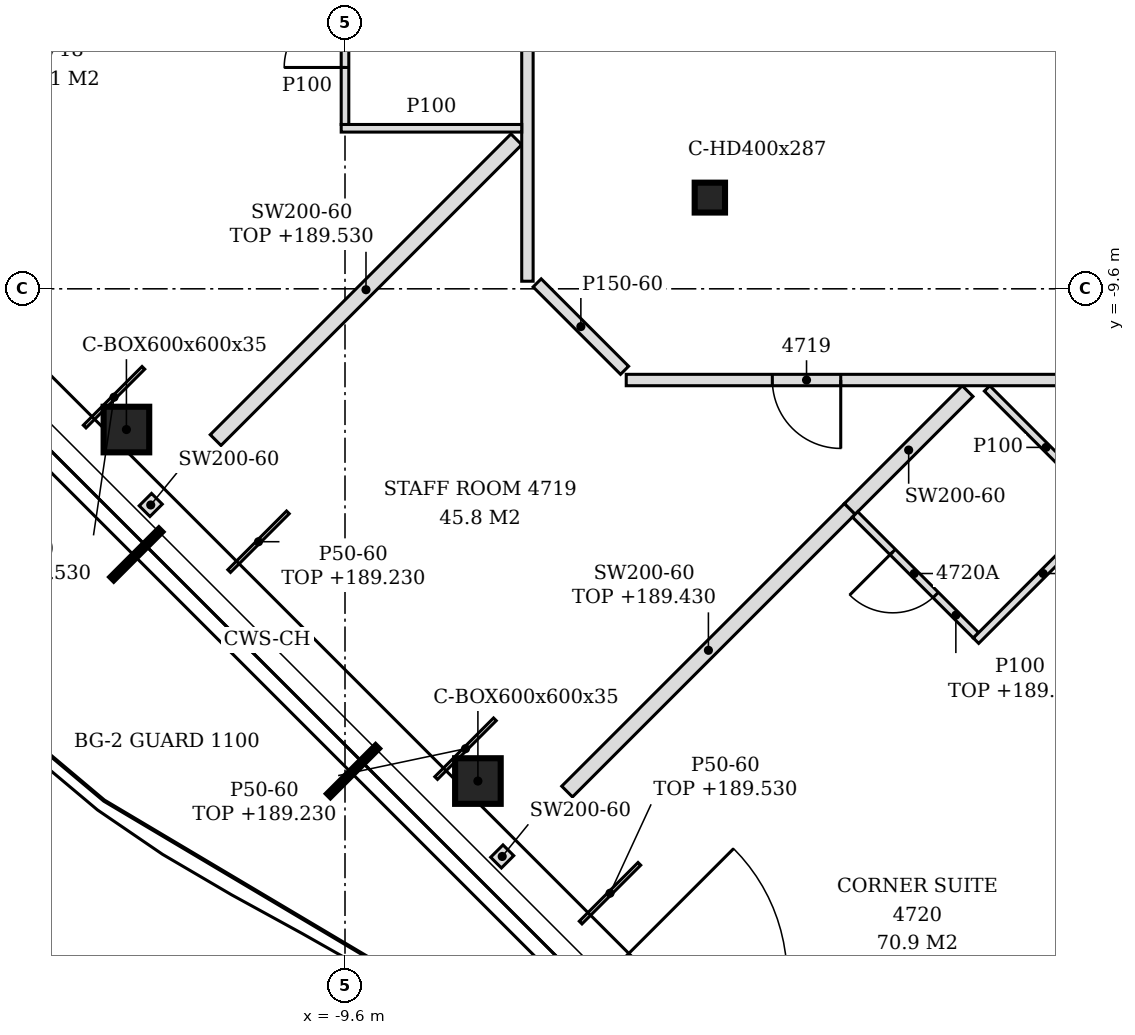
"""IFC4 building model, lengths in metres.
Left out: names, types, materials, properties, quantities, classifications, styles, units other than length and angle.
Written with IfcOpenShell. Run it as: python <this file> out.ifc"""

import sys

from ifc_helpers import new_model, si_unit, direction, frame, frame_2d, origin, origin_2d, place, context, subcontext, project, spatial, polyline, rectangle, hollow_rectangle, i_section, outline, extrude, clip, halfspace, element, fill, save


model = new_model("IFC4")
c1 = context("Model", 3, precision=1e-05, world=origin(), true_north=direction((0.0, 1.0)))
c2 = subcontext(c1, "Body", "Model", "MODEL_VIEW")
j1 = project(units=[si_unit("LENGTHUNIT", "METRE"), si_unit("PLANEANGLEUNIT", "RADIAN")], contexts=[c1])
p1 = place(None, origin())
s1 = spatial("IfcSite", under=j1, at=p1, CompositionType="ELEMENT")
p2 = place(p1, origin())
s2 = spatial("IfcBuilding", under=s1, at=p2, CompositionType="ELEMENT")
p3 = place(p2, frame((0.0, 0.0, 186.6)))
s3 = spatial("IfcBuildingStorey", under=s2, at=p3, CompositionType="ELEMENT", Elevation=186.6)
for number, where, z_axis, x_axis in (
    (1, (-12.476, -11.451, -0.15), (0.387, -0.258, 0.885), (0.555, 0.832, 0.0)),
    (2, (-7.852, -16.076, -0.15), (0.387, -0.258, 0.885), (0.555, 0.832, 0.0)),
):
    element("IfcColumn", number, at=place(p3, frame(where, z_axis=z_axis, x_axis=x_axis)), inside=s3, PredefinedType="COLUMN", context=c2, shape_type="Clipping", body=[
        clip(extrude(hollow_rectangle(XDim=0.6, YDim=0.6, WallThickness=0.035, at=origin_2d()), origin(), (0.0, 0.0, 1.0), 4.067), halfspace(frame((0.0, 0.0, 4.049), z_axis=(0.0, 0.0, 1.0), x_axis=(1.0, 0.0, 0.0)), False)),
    ])
p4 = place(p3, frame((-4.8, -8.4, -0.15), z_axis=(0.0, 0.0, 1.0), x_axis=(1.0, 0.0, 0.0)))
e3 = element("IfcColumn", 3, at=p4, inside=s3, PredefinedType="COLUMN", context=c2, shape_type="SweptSolid", body=[
    extrude(i_section(OverallWidth=0.399, OverallDepth=0.393, WebThickness=0.023, FlangeThickness=0.037, FilletRadius=0.015, at=origin_2d()), origin(), (0.0, 0.0, 1.0), 3.6),
])
p5 = place(p3, frame((-7.613, -17.149, 0.0), z_axis=(0.0, 0.0, 1.0), x_axis=(0.707639441435, 0.706573719385, 0.0)))
e4 = element("IfcWall", 4, at=p5, inside=s3, PredefinedType="PARTITIONING", context=c2, shape_type="SweptSolid", body=[
    extrude(rectangle(XDim=0.229, YDim=0.2, at=frame_2d((0.115, 0.0))), origin(), (0.0, 0.0, 1.0), 3.45),
])
p6 = place(p3, frame((-6.678, -16.214, 0.0), z_axis=(0.0, 0.0, 1.0), x_axis=(0.707199650476, 0.707013899698, 0.0)))
e5 = element("IfcWall", 5, at=p6, inside=s3, PredefinedType="PARTITIONING", context=c2, shape_type="SweptSolid", body=[
    extrude(rectangle(XDim=5.257, YDim=0.2, at=frame_2d((2.629, 0.0))), origin(), (0.0, 0.0, 1.0), 2.83),
])
p7 = place(p3, frame((-1.298, -14.159, 0.0), z_axis=(0.0, 0.0, 1.0), x_axis=(-0.707106781187, 0.707106781187, 0.0)))
e6 = element("IfcWall", 6, at=p7, inside=s3, PredefinedType="PARTITIONING", context=c2, shape_type="SweptSolid", body=[
    extrude(rectangle(XDim=2.25, YDim=0.1, at=frame_2d((1.125, 0.0))), origin(), (0.0, 0.0, 1.0), 2.88),
])
p8 = place(p7, frame((0.75, 0.0, 0.0)))
e7 = element("IfcOpeningElement", 7, at=p8, cuts=e6, PredefinedType="OPENING", context=c2, shape_type="SweptSolid", body=[
    extrude(rectangle(XDim=0.8, YDim=2.1, at=frame_2d((0.4, 1.05))), frame((0.0, 0.06, 0.0), z_axis=(0.0, -1.0, 0.0), x_axis=(1.0, 0.0, 0.0)), (0.0, 0.0, 1.0), 0.12),
])
p9 = place(p3, frame((-1.298, -14.229, 0.0), z_axis=(0.0, 0.0, 1.0), x_axis=(0.707057949532, 0.707155609469, 0.0)))
e8 = element("IfcWall", 8, at=p9, inside=s3, PredefinedType="PARTITIONING", context=c2, shape_type="SweptSolid", body=[
    extrude(rectangle(XDim=2.5, YDim=0.1, at=frame_2d((1.25, 0.0))), origin(), (0.0, 0.0, 1.0), 2.88),
])
p10 = place(p3, frame((-12.237, -12.525, 0.0), z_axis=(0.0, 0.0, 1.0), x_axis=(0.706574521886, 0.707638640142, 0.0)))
e9 = element("IfcWall", 9, at=p10, inside=s3, PredefinedType="PARTITIONING", context=c2, shape_type="SweptSolid", body=[
    extrude(rectangle(XDim=0.229, YDim=0.2, at=frame_2d((0.115, 0.0))), origin(), (0.0, 0.0, 1.0), 3.45),
])
p11 = place(p3, frame((-2.96, -12.497, 0.0), z_axis=(0.0, 0.0, 1.0), x_axis=(0.707106781187, 0.707106781187, 0.0)))
e10 = element("IfcWall", 10, at=p11, inside=s3, PredefinedType="PARTITIONING", context=c2, shape_type="SweptSolid", body=[
    extrude(rectangle(XDim=2.194, YDim=0.2, at=frame_2d((1.097, 0.0))), origin(), (0.0, 0.0, 1.0), 3.45),
])
p12 = place(p3, frame((0.399, -12.462, 0.0), z_axis=(0.0, 0.0, 1.0), x_axis=(-0.707106781187, 0.707106781187, 0.0)))
e11 = element("IfcWall", 11, at=p12, inside=s3, PredefinedType="PARTITIONING", context=c2, shape_type="SweptSolid", body=[
    extrude(rectangle(XDim=2.194, YDim=0.1, at=frame_2d((1.097, 0.0))), origin(), (0.0, 0.0, 1.0), 3.45),
])
p13 = place(p3, frame((-11.302, -11.59, 0.0), z_axis=(0.0, 0.0, 1.0), x_axis=(0.707106781187, 0.707106781187, 0.0)))
e12 = element("IfcWall", 12, at=p13, inside=s3, PredefinedType="PARTITIONING", context=c2, shape_type="SweptSolid", body=[
    extrude(rectangle(XDim=5.595, YDim=0.2, at=frame_2d((2.797, 0.0))), origin(), (0.0, 0.0, 1.0), 2.93),
])
p14 = place(p3, frame((-5.9, -10.8, 0.0), z_axis=(0.0, 0.0, 1.0), x_axis=(1.0, 0.0, 0.0)))
e13 = element("IfcWall", 13, at=p14, inside=s3, PredefinedType="PARTITIONING", context=c2, shape_type="SweptSolid", body=[
    extrude(outline(polyline([(0.0, 0.0), (26.2, 0.0), (26.2, 3.45), (25.25, 3.45), (25.248, 2.73), (24.95, 2.73), (24.948, 3.45), (13.25, 3.45), (13.248, 2.73), (12.95, 2.73), (12.948, 3.45), (1.25, 3.45), (1.248, 2.83), (0.95, 2.83), (0.948, 3.45), (0.0, 3.45), (0.0, 0.0)])), frame((0.0, 0.075, 0.0), z_axis=(0.0, -1.0, 0.0), x_axis=(1.0, 0.0, 0.0)), (0.0, 0.0, 1.0), 0.15),
])
p15 = place(p14, frame((1.922, 0.0, 0.0)))
e14 = element("IfcOpeningElement", 14, at=p15, cuts=e13, PredefinedType="OPENING", context=c2, shape_type="SweptSolid", body=[
    extrude(rectangle(XDim=0.9, YDim=2.1, at=frame_2d((0.45, 1.05))), frame((0.0, 0.085, 0.0), z_axis=(0.0, -1.0, 0.0), x_axis=(1.0, 0.0, 0.0)), (0.0, 0.0, 1.0), 0.17),
])
p16 = place(p14, frame((5.863, 0.0, 0.0)))
e15 = element("IfcOpeningElement", 15, at=p16, cuts=e13, PredefinedType="OPENING", context=c2, shape_type="SweptSolid", body=[
    extrude(rectangle(XDim=0.9, YDim=2.1, at=frame_2d((0.45, 1.05))), frame((0.0, 0.085, 0.0), z_axis=(0.0, -1.0, 0.0), x_axis=(1.0, 0.0, 0.0)), (0.0, 0.0, 1.0), 0.17),
])
p17 = place(p14, frame((9.95, 0.0, 0.0)))
e16 = element("IfcOpeningElement", 16, at=p17, cuts=e13, PredefinedType="OPENING", context=c2, shape_type="SweptSolid", body=[
    extrude(rectangle(XDim=0.9, YDim=2.1, at=frame_2d((0.45, 1.05))), frame((0.0, 0.085, 0.0), z_axis=(0.0, -1.0, 0.0), x_axis=(1.0, 0.0, 0.0)), (0.0, 0.0, 1.0), 0.17),
])
p18 = place(p14, frame((14.279, 0.0, 0.0)))
e17 = element("IfcOpeningElement", 17, at=p18, cuts=e13, PredefinedType="OPENING", context=c2, shape_type="SweptSolid", body=[
    extrude(rectangle(XDim=0.9, YDim=2.1, at=frame_2d((0.45, 1.05))), frame((0.0, 0.085, 0.0), z_axis=(0.0, -1.0, 0.0), x_axis=(1.0, 0.0, 0.0)), (0.0, 0.0, 1.0), 0.17),
])
p19 = place(p3, frame((-5.922, -10.672, 0.0), z_axis=(0.0, 0.0, 1.0), x_axis=(-0.707031720757, 0.707181833649, 0.0)))
e18 = element("IfcWall", 18, at=p19, inside=s3, PredefinedType="PARTITIONING", context=c2, shape_type="SweptSolid", body=[
    extrude(rectangle(XDim=1.626, YDim=0.15, at=frame_2d((0.813, 0.0))), origin(), (0.0, 0.0, 1.0), 3.45),
])
p20 = place(p3, frame((-7.2, -9.5, 0.0), z_axis=(0.0, 0.0, 1.0), x_axis=(0.0, 1.0, 0.0)))
e19 = element("IfcWall", 19, at=p20, inside=s3, PredefinedType="PARTITIONING", context=c2, shape_type="SweptSolid", body=[
    extrude(outline(polyline([(0.0, 0.0), (23.513, 0.0), (23.513, 3.45), (20.55, 3.45), (20.548, 2.93), (20.35, 2.93), (20.348, 3.45), (15.75, 3.45), (15.748, 2.93), (15.55, 2.93), (15.548, 3.45), (10.95, 3.45), (10.948, 2.93), (10.75, 2.93), (10.748, 3.45), (6.15, 3.45), (6.148, 2.93), (5.95, 2.93), (5.948, 3.45), (1.35, 3.45), (1.348, 2.93), (1.15, 2.93), (1.148, 3.45), (0.0, 3.45), (0.0, 0.0)])), frame((0.0, 0.075, 0.0), z_axis=(0.0, -1.0, 0.0), x_axis=(1.0, 0.0, 0.0)), (0.0, 0.0, 1.0), 0.15),
])
p21 = place(p20, frame((17.095, 0.0, 0.0)))
e20 = element("IfcOpeningElement", 20, at=p21, cuts=e19, PredefinedType="OPENING", context=c2, shape_type="SweptSolid", body=[
    extrude(rectangle(XDim=0.9, YDim=2.1, at=frame_2d((0.45, 1.05))), frame((0.0, 0.085, 0.0), z_axis=(0.0, -1.0, 0.0), x_axis=(1.0, 0.0, 0.0)), (0.0, 0.0, 1.0), 0.17),
])
p22 = place(p20, frame((13.494, 0.0, 0.0)))
e21 = element("IfcOpeningElement", 21, at=p22, cuts=e19, PredefinedType="OPENING", context=c2, shape_type="SweptSolid", body=[
    extrude(rectangle(XDim=0.9, YDim=2.1, at=frame_2d((0.45, 1.05))), frame((0.0, 0.085, 0.0), z_axis=(0.0, -1.0, 0.0), x_axis=(1.0, 0.0, 0.0)), (0.0, 0.0, 1.0), 0.17),
])
p23 = place(p20, frame((7.68, 0.0, 0.0)))
e22 = element("IfcOpeningElement", 22, at=p23, cuts=e19, PredefinedType="OPENING", context=c2, shape_type="SweptSolid", body=[
    extrude(rectangle(XDim=0.9, YDim=2.1, at=frame_2d((0.45, 1.05))), frame((0.0, 0.085, 0.0), z_axis=(0.0, -1.0, 0.0), x_axis=(1.0, 0.0, 0.0)), (0.0, 0.0, 1.0), 0.17),
])
p24 = place(p20, frame((5.137, 0.0, 0.0)))
e23 = element("IfcOpeningElement", 23, at=p24, cuts=e19, PredefinedType="OPENING", context=c2, shape_type="SweptSolid", body=[
    extrude(rectangle(XDim=0.9, YDim=2.1, at=frame_2d((0.45, 1.05))), frame((0.0, 0.085, 0.0), z_axis=(0.0, -1.0, 0.0), x_axis=(1.0, 0.0, 0.0)), (0.0, 0.0, 1.0), 0.17),
])
p25 = place(p3, frame((-9.65, -7.488, 0.0), z_axis=(0.0, 0.0, 1.0), x_axis=(1.0, 0.0, 0.0)))
e24 = element("IfcWall", 24, at=p25, inside=s3, PredefinedType="PARTITIONING", context=c2, shape_type="SweptSolid", body=[
    extrude(rectangle(XDim=2.375, YDim=0.1, at=frame_2d((1.188, 0.0))), origin(), (0.0, 0.0, 1.0), 3.45),
])
p26 = place(p3, frame((-9.6, -7.438, 0.0), z_axis=(0.0, 0.0, 1.0), x_axis=(0.0, 1.0, 0.0)))
e25 = element("IfcWall", 25, at=p26, inside=s3, PredefinedType="PARTITIONING", context=c2, shape_type="SweptSolid", body=[
    extrude(rectangle(XDim=2.3, YDim=0.1, at=frame_2d((1.15, 0.0))), origin(), (0.0, 0.0, 1.0), 3.45),
])
p27 = place(p26, frame((0.75, 0.0, 0.0)))
e26 = element("IfcOpeningElement", 26, at=p27, cuts=e25, PredefinedType="OPENING", context=c2, shape_type="SweptSolid", body=[
    extrude(rectangle(XDim=0.8, YDim=2.1, at=frame_2d((0.4, 1.05))), frame((0.0, 0.06, 0.0), z_axis=(0.0, -1.0, 0.0), x_axis=(1.0, 0.0, 0.0)), (0.0, 0.0, 1.0), 0.12),
])
p28 = place(p3, frame((-6.5, -17.938, 0.0), z_axis=(0.0, 0.0, 1.0), x_axis=(0.707106781187, 0.707106781187, 0.0)))
e27 = element("IfcWall", 27, at=p28, inside=s3, PredefinedType="PARTITIONING", context=c2, shape_type="SweptSolid", body=[
    extrude(rectangle(XDim=1.093, YDim=0.05, at=frame_2d((0.546, 0.0))), origin(), (0.0, 0.0, 1.0), 2.93),
])
p29 = place(p3, frame((-8.401, -16.036, 0.0), z_axis=(0.0, 0.0, 1.0), x_axis=(0.707106781187, 0.707106781187, 0.0)))
e28 = element("IfcWall", 28, at=p29, inside=s3, PredefinedType="PARTITIONING", context=c2, shape_type="SweptSolid", body=[
    extrude(rectangle(XDim=1.093, YDim=0.05, at=frame_2d((0.546, 0.0))), origin(), (0.0, 0.0, 1.0), 2.63),
])
p30 = place(p3, frame((-13.025, -11.412, 0.0), z_axis=(0.0, 0.0, 1.0), x_axis=(0.707106781187, 0.707106781187, 0.0)))
e29 = element("IfcWall", 29, at=p30, inside=s3, PredefinedType="PARTITIONING", context=c2, shape_type="SweptSolid", body=[
    extrude(rectangle(XDim=1.093, YDim=0.05, at=frame_2d((0.546, 0.0))), origin(), (0.0, 0.0, 1.0), 2.93),
])
p31 = place(p3, frame((-11.124, -13.313, 0.0), z_axis=(0.0, 0.0, 1.0), x_axis=(0.707106781187, 0.707106781187, 0.0)))
e30 = element("IfcWall", 30, at=p31, inside=s3, PredefinedType="PARTITIONING", context=c2, shape_type="SweptSolid", body=[
    extrude(rectangle(XDim=1.093, YDim=0.05, at=frame_2d((0.546, 0.0))), origin(), (0.0, 0.0, 1.0), 2.63),
])
p32 = place(p27, origin())
e31 = element("IfcDoor", 31, at=p32, inside=s3, OperationType="SINGLE_SWING_LEFT", PredefinedType="DOOR", context=c2, shape_type="SweptSolid", body=[
    extrude(rectangle(XDim=0.8, YDim=2.1, at=frame_2d((0.4, 1.05))), frame((0.0, 0.025, 0.0), z_axis=(0.0, -1.0, 0.0), x_axis=(1.0, 0.0, 0.0)), (0.0, 0.0, 1.0), 0.05),
])
fill(e26, e31)
p33 = place(p15, frame((0.9, 0.0, 0.0), z_axis=(0.0, 0.0, 1.0), x_axis=(-1.0, 0.0, 0.0)))
e32 = element("IfcDoor", 32, at=p33, inside=s3, OperationType="SINGLE_SWING_LEFT", PredefinedType="DOOR", context=c2, shape_type="SweptSolid", body=[
    extrude(rectangle(XDim=0.9, YDim=2.1, at=frame_2d((0.45, 1.05))), frame((0.0, 0.025, 0.0), z_axis=(0.0, -1.0, 0.0), x_axis=(1.0, 0.0, 0.0)), (0.0, 0.0, 1.0), 0.05),
])
fill(e14, e32)
p34 = place(p8, origin())
e33 = element("IfcDoor", 33, at=p34, inside=s3, OperationType="SINGLE_SWING_RIGHT", PredefinedType="DOOR", context=c2, shape_type="SweptSolid", body=[
    extrude(rectangle(XDim=0.8, YDim=2.1, at=frame_2d((0.4, 1.05))), frame((0.0, 0.025, 0.0), z_axis=(0.0, -1.0, 0.0), x_axis=(1.0, 0.0, 0.0)), (0.0, 0.0, 1.0), 0.05),
])
fill(e7, e33)
save(model, sys.argv[1])
